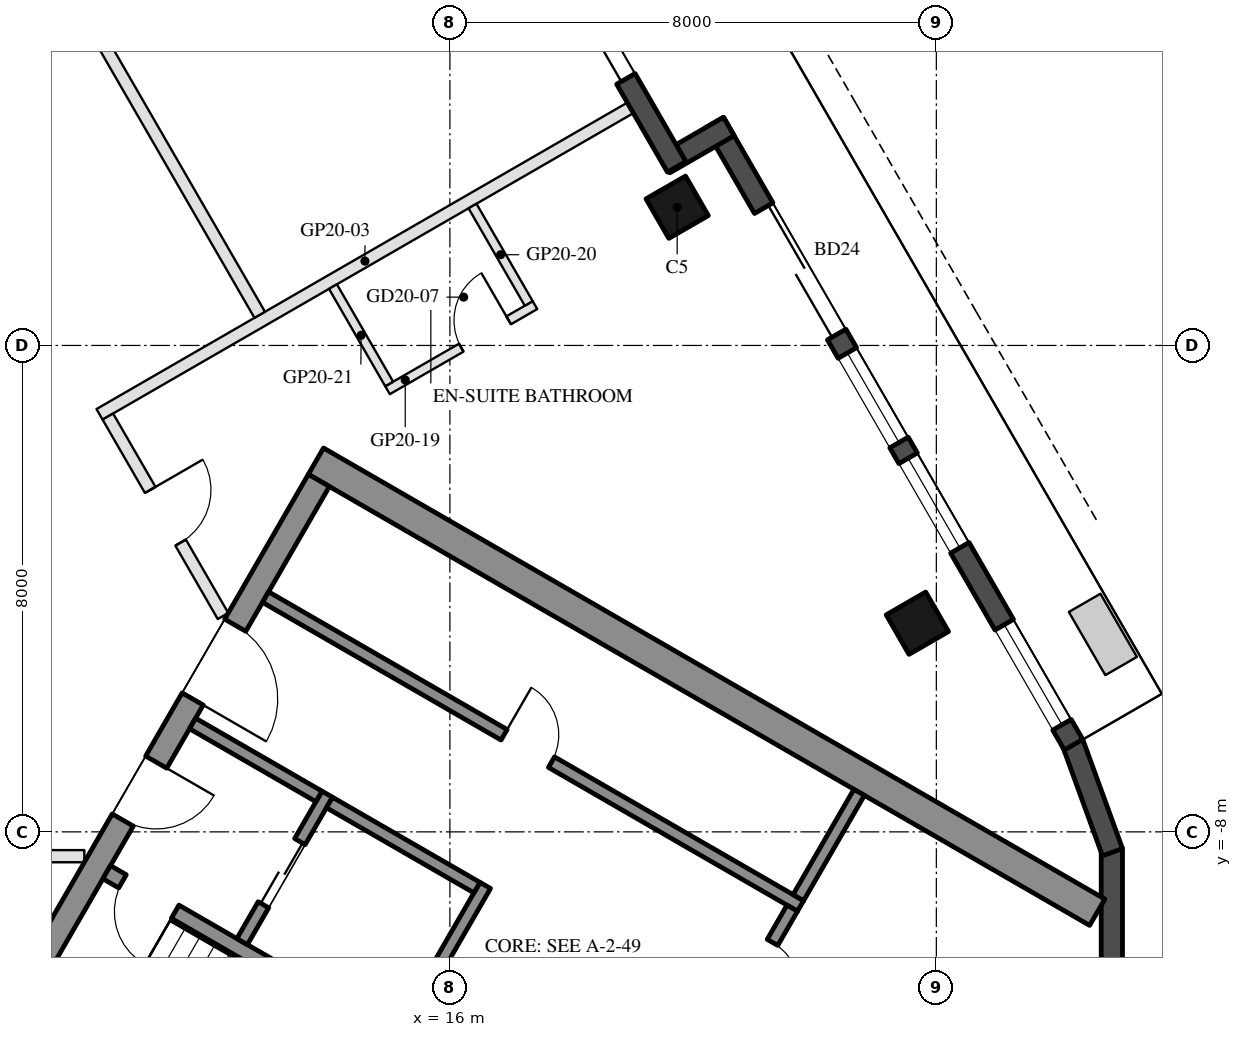
"""IFC4 building model, lengths in metres.
Left out: names, types, materials, properties, quantities, classifications, styles, units other than length and angle.
Written with IfcOpenShell. Run it as: python <this file> out.ifc"""

import sys

from ifc_helpers import new_model, si_unit, direction, frame, frame_2d, origin, origin_2d, place, context, subcontext, project, spatial, rectangle, hollow_rectangle, extrude, element, fill, save


model = new_model("IFC4")
c1 = context("Model", 3, precision=1e-05, world=origin(), true_north=direction((0.0, 1.0)))
c2 = subcontext(c1, "Body", "Model", "MODEL_VIEW")
j1 = project(units=[si_unit("LENGTHUNIT", "METRE"), si_unit("PLANEANGLEUNIT", "RADIAN")], contexts=[c1])
p1 = place(None, origin())
s1 = spatial("IfcSite", under=j1, at=p1, CompositionType="ELEMENT")
p2 = place(p1, origin())
s2 = spatial("IfcBuilding", under=s1, at=p2, CompositionType="ELEMENT")
p3 = place(p2, frame((0.0, 0.0, 213.2)))
s3 = spatial("IfcBuildingStorey", under=s2, at=p3, CompositionType="ELEMENT", Elevation=213.2)
for number, where, z_axis, x_axis in (
    (1, (23.688, -4.568, 0.0), (0.0, 0.0, 1.0), (-0.5, 0.866, 0.0)),
    (2, (19.738, 2.273, 0.0), (0.0, 0.0, 1.0), (-0.5, 0.866, 0.0)),
):
    element("IfcColumn", number, at=place(p3, frame(where, z_axis=z_axis, x_axis=x_axis)), inside=s3, PredefinedType="COLUMN", context=c2, shape_type="SweptSolid", body=[
        extrude(hollow_rectangle(XDim=0.75, YDim=0.75, WallThickness=0.035, at=origin_2d()), origin(), (0.0, 0.0, 1.0), 3.7),
    ])
for number, where, z_axis, x_axis in (
    (3, (26.244, -11.92, 0.0), (0.0, 0.0, 1.0), (0.342, 0.94, 0.0)),
    (4, (26.886, -10.185, 0.0), (0.0, 0.0, 1.0), (0.0, 1.0, 0.0)),
    (5, (26.897, -8.335, 0.0), (0.0, 0.0, 1.0), (-0.342, 0.94, 0.0)),
):
    element("IfcWall", number, at=place(p3, frame(where, z_axis=z_axis, x_axis=x_axis)), inside=s3, PredefinedType="SOLIDWALL", context=c2, shape_type="SweptSolid", body=[
        extrude(rectangle(XDim=1.91, YDim=0.35, at=frame_2d((0.955, 0.0))), origin(), (0.0, 0.0, 1.0), 3.55),
    ])
p4 = place(p3, frame((26.257, -6.567, 0.0), z_axis=(0.0, 0.0, 1.0), x_axis=(-0.500023526245, 0.866011820475, 0.0)))
e6 = element("IfcWall", 6, at=p4, inside=s3, PredefinedType="SOLIDWALL", context=c2, shape_type="SweptSolid", body=[
    extrude(rectangle(XDim=11.816, YDim=0.35, at=frame_2d((5.908, 0.0))), origin(), (0.0, 0.0, 1.0), 3.55),
])
p5 = place(p4, frame((0.38, 0.0, 0.3)))
e7 = element("IfcOpeningElement", 7, at=p5, cuts=e6, PredefinedType="OPENING", context=c2, shape_type="SweptSolid", body=[
    extrude(rectangle(XDim=1.9, YDim=2.65, at=frame_2d((0.95, 1.325))), frame((0.0, 0.185, 0.0), z_axis=(0.0, -1.0, 0.0), x_axis=(1.0, 0.0, 0.0)), (0.0, 0.0, 1.0), 0.37),
])
p6 = place(p4, frame((7.791, 0.0, 0.0)))
e8 = element("IfcOpeningElement", 8, at=p6, cuts=e6, PredefinedType="OPENING", context=c2, shape_type="SweptSolid", body=[
    extrude(rectangle(XDim=2.4, YDim=2.4, at=frame_2d((1.2, 1.2))), frame((0.0, 0.185, 0.0), z_axis=(0.0, -1.0, 0.0), x_axis=(1.0, 0.0, 0.0)), (0.0, 0.0, 1.0), 0.37),
])
p7 = place(p4, frame((3.741, 0.0, 0.3)))
e9 = element("IfcOpeningElement", 9, at=p7, cuts=e6, PredefinedType="OPENING", context=c2, shape_type="SweptSolid", body=[
    extrude(rectangle(XDim=1.7, YDim=2.65, at=frame_2d((0.85, 1.325))), frame((0.0, 0.185, 0.0), z_axis=(0.0, -1.0, 0.0), x_axis=(1.0, 0.0, 0.0)), (0.0, 0.0, 1.0), 0.37),
])
p8 = place(p4, frame((5.741, 0.0, 0.3)))
e10 = element("IfcOpeningElement", 10, at=p8, cuts=e6, PredefinedType="OPENING", context=c2, shape_type="SweptSolid", body=[
    extrude(rectangle(XDim=1.7, YDim=2.65, at=frame_2d((0.85, 1.325))), frame((0.0, 0.185, 0.0), z_axis=(0.0, -1.0, 0.0), x_axis=(1.0, 0.0, 0.0)), (0.0, 0.0, 1.0), 0.37),
])
p9 = place(p3, frame((20.588, 3.601, 0.0), z_axis=(0.0, 0.0, 1.0), x_axis=(-0.866005645448, -0.500034220881, 0.0)))
e11 = element("IfcWall", 11, at=p9, inside=s3, PredefinedType="SOLIDWALL", context=c2, shape_type="SweptSolid", body=[
    extrude(rectangle(XDim=1.22, YDim=0.35, at=frame_2d((0.61, 0.0))), origin(), (0.0, 0.0, 1.0), 3.55),
])
p10 = place(p3, frame((19.729, 2.938, 0.0), z_axis=(0.0, 0.0, 1.0), x_axis=(-0.499976430342, 0.866039011305, 0.0)))
e12 = element("IfcWall", 12, at=p10, inside=s3, PredefinedType="SOLIDWALL", context=c2, shape_type="SweptSolid", body=[
    extrude(rectangle(XDim=6.74, YDim=0.35, at=frame_2d((3.37, 0.0))), origin(), (0.0, 0.0, 1.0), 3.55),
])
p11 = place(p10, frame((1.67, 0.0, 0.0)))
e13 = element("IfcOpeningElement", 13, at=p11, cuts=e12, PredefinedType="OPENING", context=c2, shape_type="SweptSolid", body=[
    extrude(rectangle(XDim=2.4, YDim=2.4, at=frame_2d((1.2, 1.2))), frame((0.0, 0.185, 0.0), z_axis=(0.0, -1.0, 0.0), x_axis=(1.0, 0.0, 0.0)), (0.0, 0.0, 1.0), 0.37),
])
p12 = place(p10, frame((4.37, 0.0, 0.3)))
e14 = element("IfcOpeningElement", 14, at=p12, cuts=e12, PredefinedType="OPENING", context=c2, shape_type="SweptSolid", body=[
    extrude(rectangle(XDim=1.5, YDim=2.65, at=frame_2d((0.75, 1.325))), frame((0.0, 0.185, 0.0), z_axis=(0.0, -1.0, 0.0), x_axis=(1.0, 0.0, 0.0)), (0.0, 0.0, 1.0), 0.37),
])
p13 = place(p3, frame((13.797, -1.903, 0.0), z_axis=(0.0, 0.0, 1.0), x_axis=(0.866025009528, -0.500000682871, 0.0)))
e15 = element("IfcWall", 15, at=p13, inside=s3, PredefinedType="SHEAR", context=c2, shape_type="SweptSolid", body=[
    extrude(rectangle(XDim=14.837, YDim=0.5, at=frame_2d((7.418, 0.0))), origin(), (0.0, 0.0, 1.0), 3.5),
])
p14 = place(p3, frame((8.845, -10.88, 0.0), z_axis=(0.0, 0.0, 1.0), x_axis=(0.500004234368, 0.866022959057, 0.0)))
e16 = element("IfcWall", 16, at=p14, inside=s3, PredefinedType="SHEAR", context=c2, shape_type="SweptSolid", body=[
    extrude(rectangle(XDim=10.0, YDim=0.4, at=frame_2d((5.0, 0.0))), origin(), (0.0, 0.0, 1.0), 3.5),
])
p15 = place(p14, frame((3.55, 0.0, 0.0)))
e17 = element("IfcOpeningElement", 17, at=p15, cuts=e16, PredefinedType="OPENING", context=c2, shape_type="SweptSolid", body=[
    extrude(rectangle(XDim=1.1, YDim=2.1, at=frame_2d((0.55, 1.05))), frame((0.0, 0.21, 0.0), z_axis=(0.0, -1.0, 0.0), x_axis=(1.0, 0.0, 0.0)), (0.0, 0.0, 1.0), 0.42),
])
p16 = place(p14, frame((5.85, 0.0, 0.0)))
e18 = element("IfcOpeningElement", 18, at=p16, cuts=e16, PredefinedType="OPENING", context=c2, shape_type="SweptSolid", body=[
    extrude(rectangle(XDim=1.4, YDim=2.1, at=frame_2d((0.7, 1.05))), frame((0.0, 0.21, 0.0), z_axis=(0.0, -1.0, 0.0), x_axis=(1.0, 0.0, 0.0)), (0.0, 0.0, 1.0), 0.42),
])
p17 = place(p3, frame((10.356, -8.664, 0.0), z_axis=(0.0, 0.0, 1.0), x_axis=(0.866028629588, -0.499994412703, 0.0)))
e19 = element("IfcWall", 19, at=p17, inside=s3, PredefinedType="SHEAR", context=c2, shape_type="SweptSolid", body=[
    extrude(rectangle(XDim=6.45, YDim=0.25, at=frame_2d((3.225, 0.0))), origin(), (0.0, 0.0, 1.0), 3.5),
])
p18 = place(p17, frame((0.3, 0.0, 0.0)))
e20 = element("IfcOpeningElement", 20, at=p18, cuts=e19, PredefinedType="OPENING", context=c2, shape_type="SweptSolid", body=[
    extrude(rectangle(XDim=1.0, YDim=2.1, at=frame_2d((0.5, 1.05))), frame((0.0, 0.135, 0.0), z_axis=(0.0, -1.0, 0.0), x_axis=(1.0, 0.0, 0.0)), (0.0, 0.0, 1.0), 0.27),
])
p19 = place(p3, frame((15.181, -11.305, 0.0), z_axis=(0.0, 0.0, 1.0), x_axis=(0.49994636267, 0.866056369097, 0.0)))
e21 = element("IfcWall", 21, at=p19, inside=s3, PredefinedType="SHEAR", context=c2, shape_type="SweptSolid", body=[
    extrude(rectangle(XDim=2.8, YDim=0.2, at=frame_2d((1.4, 0.0))), origin(), (0.0, 0.0, 1.0), 3.5),
])
p20 = place(p3, frame((12.583, -9.805, 0.0), z_axis=(0.0, 0.0, 1.0), x_axis=(0.49994636267, 0.866056369097, 0.0)))
e22 = element("IfcWall", 22, at=p20, inside=s3, PredefinedType="SHEAR", context=c2, shape_type="SweptSolid", body=[
    extrude(rectangle(XDim=2.8, YDim=0.2, at=frame_2d((1.4, 0.0))), origin(), (0.0, 0.0, 1.0), 3.5),
])
p21 = place(p20, frame((0.7, 0.0, 0.0)))
e23 = element("IfcOpeningElement", 23, at=p21, cuts=e22, PredefinedType="OPENING", context=c2, shape_type="SweptSolid", body=[
    extrude(rectangle(XDim=1.2, YDim=2.1, at=frame_2d((0.6, 1.05))), frame((0.0, 0.11, 0.0), z_axis=(0.0, -1.0, 0.0), x_axis=(1.0, 0.0, 0.0)), (0.0, 0.0, 1.0), 0.22),
])
p22 = place(p3, frame((11.768, -6.217, 0.0), z_axis=(0.0, 0.0, 1.0), x_axis=(0.866050077142, -0.499957262057, 0.0)))
e24 = element("IfcWall", 24, at=p22, inside=s3, PredefinedType="SHEAR", context=c2, shape_type="SweptSolid", body=[
    extrude(rectangle(XDim=2.4, YDim=0.2, at=frame_2d((1.2, 0.0))), origin(), (0.0, 0.0, 1.0), 3.5),
])
p23 = place(p3, frame((14.02, -7.517, 0.0), z_axis=(0.0, 0.0, 1.0), x_axis=(0.866034573852, -0.49998411664, 0.0)))
e25 = element("IfcWall", 25, at=p23, inside=s3, PredefinedType="SHEAR", context=c2, shape_type="SweptSolid", body=[
    extrude(rectangle(XDim=2.8, YDim=0.2, at=frame_2d((1.4, 0.0))), origin(), (0.0, 0.0, 1.0), 3.5),
])
p24 = place(p3, frame((12.968, -4.138, 0.0), z_axis=(0.0, 0.0, 1.0), x_axis=(0.866028328073, -0.49999493495, 0.0)))
e26 = element("IfcWall", 26, at=p24, inside=s3, PredefinedType="SHEAR", context=c2, shape_type="SweptSolid", body=[
    extrude(rectangle(XDim=10.16, YDim=0.2, at=frame_2d((5.08, 0.0))), origin(), (0.0, 0.0, 1.0), 3.5),
])
p25 = place(p24, frame((4.53, 0.0, 0.0)))
e27 = element("IfcOpeningElement", 27, at=p25, cuts=e26, PredefinedType="OPENING", context=c2, shape_type="SweptSolid", body=[
    extrude(rectangle(XDim=0.9, YDim=2.1, at=frame_2d((0.45, 1.05))), frame((0.0, 0.11, 0.0), z_axis=(0.0, -1.0, 0.0), x_axis=(1.0, 0.0, 0.0)), (0.0, 0.0, 1.0), 0.22),
])
p26 = place(p3, frame((20.43, -11.333, 0.0), z_axis=(0.0, 0.0, 1.0), x_axis=(0.500001309137, 0.866024647952, 0.0)))
e28 = element("IfcWall", 28, at=p26, inside=s3, PredefinedType="SHEAR", context=c2, shape_type="SweptSolid", body=[
    extrude(rectangle(XDim=2.4, YDim=0.2, at=frame_2d((1.2, 0.0))), origin(), (0.0, 0.0, 1.0), 3.5),
])
p27 = place(p26, frame((0.85, 0.0, 0.0)))
e29 = element("IfcOpeningElement", 29, at=p27, cuts=e28, PredefinedType="OPENING", context=c2, shape_type="SweptSolid", body=[
    extrude(rectangle(XDim=0.9, YDim=2.1, at=frame_2d((0.45, 1.05))), frame((0.0, 0.11, 0.0), z_axis=(0.0, -1.0, 0.0), x_axis=(1.0, 0.0, 0.0)), (0.0, 0.0, 1.0), 0.22),
])
p28 = place(p3, frame((21.73, -9.082, 0.0), z_axis=(0.0, 0.0, 1.0), x_axis=(0.50002537861, 0.866010750942, 0.0)))
e30 = element("IfcWall", 30, at=p28, inside=s3, PredefinedType="SHEAR", context=c2, shape_type="SweptSolid", body=[
    extrude(rectangle(XDim=2.0, YDim=0.2, at=frame_2d((1.0, 0.0))), origin(), (0.0, 0.0, 1.0), 3.5),
])
p29 = place(p3, frame((18.968, 3.907, 0.0), z_axis=(0.0, 0.0, 1.0), x_axis=(-0.866022637375, -0.500004791531, 0.0)))
e31 = element("IfcWall", 31, at=p29, inside=s3, PredefinedType="PARTITIONING", context=c2, shape_type="SweptSolid", body=[
    extrude(rectangle(XDim=10.08, YDim=0.2, at=frame_2d((5.04, 0.0))), origin(), (0.0, 0.0, 1.0), 3.06),
])
p30 = place(p3, frame((9.988, -8.4, 0.0), z_axis=(0.0, 0.0, 1.0), x_axis=(-1.0, 0.0, 0.0)))
e32 = element("IfcWall", 32, at=p30, inside=s3, PredefinedType="PARTITIONING", context=c2, shape_type="SweptSolid", body=[
    extrude(rectangle(XDim=6.385, YDim=0.2, at=frame_2d((3.192, 0.0))), origin(), (0.0, 0.0, 1.0), 2.95),
])
p31 = place(p30, frame((2.692, 0.0, 0.0)))
e33 = element("IfcOpeningElement", 33, at=p31, cuts=e32, PredefinedType="OPENING", context=c2, shape_type="SweptSolid", body=[
    extrude(rectangle(XDim=1.0, YDim=2.1, at=frame_2d((0.5, 1.05))), frame((0.0, 0.11, 0.0), z_axis=(0.0, -1.0, 0.0), x_axis=(1.0, 0.0, 0.0)), (0.0, 0.0, 1.0), 0.22),
])
p32 = place(p3, frame((10.375, -1.169, 0.0), z_axis=(0.0, 0.0, 1.0), x_axis=(0.500055316652, -0.865993464345, 0.0)))
e34 = element("IfcWall", 34, at=p32, inside=s3, PredefinedType="PARTITIONING", context=c2, shape_type="SweptSolid", body=[
    extrude(rectangle(XDim=3.788, YDim=0.2, at=frame_2d((1.894, 0.0))), origin(), (0.0, 0.0, 1.0), 2.95),
])
p33 = place(p32, frame((1.394, 0.0, 0.0)))
e35 = element("IfcOpeningElement", 35, at=p33, cuts=e34, PredefinedType="OPENING", context=c2, shape_type="SweptSolid", body=[
    extrude(rectangle(XDim=1.0, YDim=2.1, at=frame_2d((0.5, 1.05))), frame((0.0, 0.11, 0.0), z_axis=(0.0, -1.0, 0.0), x_axis=(1.0, 0.0, 0.0)), (0.0, 0.0, 1.0), 0.22),
])
p34 = place(p3, frame((14.974, -0.737, 0.0), z_axis=(0.0, 0.0, 1.0), x_axis=(0.866018616679, 0.500011755427, 0.0)))
e36 = element("IfcWall", 36, at=p34, inside=s3, PredefinedType="PARTITIONING", context=c2, shape_type="SweptSolid", body=[
    extrude(rectangle(XDim=2.8, YDim=0.15, at=frame_2d((1.4, 0.0))), origin(), (0.0, 0.0, 1.0), 3.55),
])
p35 = place(p34, frame((1.4, 0.0, 0.0)))
e37 = element("IfcOpeningElement", 37, at=p35, cuts=e36, PredefinedType="OPENING", context=c2, shape_type="SweptSolid", body=[
    extrude(rectangle(XDim=0.9, YDim=2.1, at=frame_2d((0.45, 1.05))), frame((0.0, 0.085, 0.0), z_axis=(0.0, -1.0, 0.0), x_axis=(1.0, 0.0, 0.0)), (0.0, 0.0, 1.0), 0.17),
])
p36 = place(p3, frame((17.297, 0.691, 0.0), z_axis=(0.0, 0.0, 1.0), x_axis=(-0.499985172903, 0.866033964044, 0.0)))
e38 = element("IfcWall", 38, at=p36, inside=s3, PredefinedType="PARTITIONING", context=c2, shape_type="SweptSolid", body=[
    extrude(rectangle(XDim=1.85, YDim=0.15, at=frame_2d((0.925, 0.0))), origin(), (0.0, 0.0, 1.0), 2.95),
])
p37 = place(p3, frame((15.002, -0.634, 0.0), z_axis=(0.0, 0.0, 1.0), x_axis=(-0.500042316284, 0.866000971088, 0.0)))
e39 = element("IfcWall", 39, at=p37, inside=s3, PredefinedType="PARTITIONING", context=c2, shape_type="SweptSolid", body=[
    extrude(rectangle(XDim=1.85, YDim=0.15, at=frame_2d((0.925, 0.0))), origin(), (0.0, 0.0, 1.0), 2.95),
])
p38 = place(p3, frame((7.101, 10.501, 0.0), z_axis=(0.0, 0.0, 1.0), x_axis=(0.500001329633, -0.866024636119, 0.0)))
e40 = element("IfcWall", 40, at=p38, inside=s3, PredefinedType="PARTITIONING", context=c2, shape_type="SweptSolid", body=[
    extrude(rectangle(XDim=11.544, YDim=0.2, at=frame_2d((5.772, 0.0))), origin(), (0.0, 0.0, 1.0), 2.95),
])
p39 = place(p38, frame((2.455, 0.0, 0.0)))
e41 = element("IfcOpeningElement", 41, at=p39, cuts=e40, PredefinedType="OPENING", context=c2, shape_type="SweptSolid", body=[
    extrude(rectangle(XDim=1.0, YDim=2.1, at=frame_2d((0.5, 1.05))), frame((0.0, 0.11, 0.0), z_axis=(0.0, -1.0, 0.0), x_axis=(1.0, 0.0, 0.0)), (0.0, 0.0, 1.0), 0.22),
])
p40 = place(p5, origin())
e42 = element("IfcWindow", 42, at=p40, inside=s3, PartitioningType="SINGLE_PANEL", PredefinedType="WINDOW", context=c2, shape_type="SweptSolid", body=[
    extrude(rectangle(XDim=1.9, YDim=2.65, at=frame_2d((0.95, 1.325))), frame((0.0, 0.03, 0.0), z_axis=(0.0, -1.0, 0.0), x_axis=(1.0, 0.0, 0.0)), (0.0, 0.0, 1.0), 0.06),
])
fill(e7, e42)
p41 = place(p6, frame((2.4, 0.0, 0.0), z_axis=(0.0, 0.0, 1.0), x_axis=(-1.0, 0.0, 0.0)))
e43 = element("IfcDoor", 43, at=p41, inside=s3, OperationType="SLIDING_TO_LEFT", PredefinedType="DOOR", context=c2, shape_type="SweptSolid", body=[
    extrude(rectangle(XDim=2.4, YDim=2.4, at=frame_2d((1.2, 1.2))), frame((0.0, 0.025, 0.0), z_axis=(0.0, -1.0, 0.0), x_axis=(1.0, 0.0, 0.0)), (0.0, 0.0, 1.0), 0.05),
])
fill(e8, e43)
p42 = place(p7, origin())
e44 = element("IfcWindow", 44, at=p42, inside=s3, PartitioningType="SINGLE_PANEL", PredefinedType="WINDOW", context=c2, shape_type="SweptSolid", body=[
    extrude(rectangle(XDim=1.7, YDim=2.65, at=frame_2d((0.85, 1.325))), frame((0.0, 0.03, 0.0), z_axis=(0.0, -1.0, 0.0), x_axis=(1.0, 0.0, 0.0)), (0.0, 0.0, 1.0), 0.06),
])
fill(e9, e44)
p43 = place(p8, origin())
e45 = element("IfcWindow", 45, at=p43, inside=s3, PartitioningType="SINGLE_PANEL", PredefinedType="WINDOW", context=c2, shape_type="SweptSolid", body=[
    extrude(rectangle(XDim=1.7, YDim=2.65, at=frame_2d((0.85, 1.325))), frame((0.0, 0.03, 0.0), z_axis=(0.0, -1.0, 0.0), x_axis=(1.0, 0.0, 0.0)), (0.0, 0.0, 1.0), 0.06),
])
fill(e10, e45)
p44 = place(p11, frame((2.4, 0.0, 0.0), z_axis=(0.0, 0.0, 1.0), x_axis=(-1.0, 0.0, 0.0)))
e46 = element("IfcDoor", 46, at=p44, inside=s3, OperationType="SLIDING_TO_LEFT", PredefinedType="DOOR", context=c2, shape_type="SweptSolid", body=[
    extrude(rectangle(XDim=2.4, YDim=2.4, at=frame_2d((1.2, 1.2))), frame((0.0, 0.025, 0.0), z_axis=(0.0, -1.0, 0.0), x_axis=(1.0, 0.0, 0.0)), (0.0, 0.0, 1.0), 0.05),
])
fill(e13, e46)
p45 = place(p21, origin())
e47 = element("IfcDoor", 47, at=p45, inside=s3, OperationType="DOUBLE_DOOR_SLIDING", PredefinedType="DOOR", context=c2, shape_type="SweptSolid", body=[
    extrude(rectangle(XDim=1.2, YDim=2.1, at=frame_2d((0.6, 1.05))), frame((0.0, 0.025, 0.0), z_axis=(0.0, -1.0, 0.0), x_axis=(1.0, 0.0, 0.0)), (0.0, 0.0, 1.0), 0.05),
])
fill(e23, e47)
p46 = place(p25, origin())
e48 = element("IfcDoor", 48, at=p46, inside=s3, OperationType="SINGLE_SWING_LEFT", PredefinedType="DOOR", context=c2, shape_type="SweptSolid", body=[
    extrude(rectangle(XDim=0.9, YDim=2.1, at=frame_2d((0.45, 1.05))), frame((0.0, 0.025, 0.0), z_axis=(0.0, -1.0, 0.0), x_axis=(1.0, 0.0, 0.0)), (0.0, 0.0, 1.0), 0.05),
])
fill(e27, e48)
p47 = place(p27, frame((0.9, 0.0, 0.0), z_axis=(0.0, 0.0, 1.0), x_axis=(-1.0, 0.0, 0.0)))
e49 = element("IfcDoor", 49, at=p47, inside=s3, OperationType="SINGLE_SWING_RIGHT", PredefinedType="DOOR", context=c2, shape_type="SweptSolid", body=[
    extrude(rectangle(XDim=0.9, YDim=2.1, at=frame_2d((0.45, 1.05))), frame((0.0, 0.025, 0.0), z_axis=(0.0, -1.0, 0.0), x_axis=(1.0, 0.0, 0.0)), (0.0, 0.0, 1.0), 0.05),
])
fill(e29, e49)
p48 = place(p15, frame((1.1, 0.0, 0.0), z_axis=(0.0, 0.0, 1.0), x_axis=(-1.0, 0.0, 0.0)))
e50 = element("IfcDoor", 50, at=p48, inside=s3, OperationType="SINGLE_SWING_LEFT", PredefinedType="DOOR", context=c2, shape_type="SweptSolid", body=[
    extrude(rectangle(XDim=1.1, YDim=2.1, at=frame_2d((0.55, 1.05))), frame((0.0, 0.025, 0.0), z_axis=(0.0, -1.0, 0.0), x_axis=(1.0, 0.0, 0.0)), (0.0, 0.0, 1.0), 0.05),
])
fill(e17, e50)
p49 = place(p16, frame((1.4, 0.0, 0.0), z_axis=(0.0, 0.0, 1.0), x_axis=(-1.0, 0.0, 0.0)))
e51 = element("IfcDoor", 51, at=p49, inside=s3, OperationType="DOUBLE_DOOR_SINGLE_SWING", PredefinedType="DOOR", context=c2, shape_type="SweptSolid", body=[
    extrude(rectangle(XDim=1.4, YDim=2.1, at=frame_2d((0.7, 1.05))), frame((0.0, 0.025, 0.0), z_axis=(0.0, -1.0, 0.0), x_axis=(1.0, 0.0, 0.0)), (0.0, 0.0, 1.0), 0.05),
])
fill(e18, e51)
p50 = place(p18, frame((1.0, 0.0, 0.0), z_axis=(0.0, 0.0, 1.0), x_axis=(-1.0, 0.0, 0.0)))
e52 = element("IfcDoor", 52, at=p50, inside=s3, OperationType="SINGLE_SWING_LEFT", PredefinedType="DOOR", context=c2, shape_type="SweptSolid", body=[
    extrude(rectangle(XDim=1.0, YDim=2.1, at=frame_2d((0.5, 1.05))), frame((0.0, 0.025, 0.0), z_axis=(0.0, -1.0, 0.0), x_axis=(1.0, 0.0, 0.0)), (0.0, 0.0, 1.0), 0.05),
])
fill(e20, e52)
p51 = place(p35, origin())
e53 = element("IfcDoor", 53, at=p51, inside=s3, OperationType="SINGLE_SWING_RIGHT", PredefinedType="DOOR", context=c2, shape_type="SweptSolid", body=[
    extrude(rectangle(XDim=0.9, YDim=2.1, at=frame_2d((0.45, 1.05))), frame((0.0, 0.025, 0.0), z_axis=(0.0, -1.0, 0.0), x_axis=(1.0, 0.0, 0.0)), (0.0, 0.0, 1.0), 0.05),
])
fill(e37, e53)
p52 = place(p33, origin())
e54 = element("IfcDoor", 54, at=p52, inside=s3, OperationType="SINGLE_SWING_LEFT", PredefinedType="DOOR", context=c2, shape_type="SweptSolid", body=[
    extrude(rectangle(XDim=1.0, YDim=2.1, at=frame_2d((0.5, 1.05))), frame((0.0, 0.025, 0.0), z_axis=(0.0, -1.0, 0.0), x_axis=(1.0, 0.0, 0.0)), (0.0, 0.0, 1.0), 0.05),
])
fill(e35, e54)
save(model, sys.argv[1])
